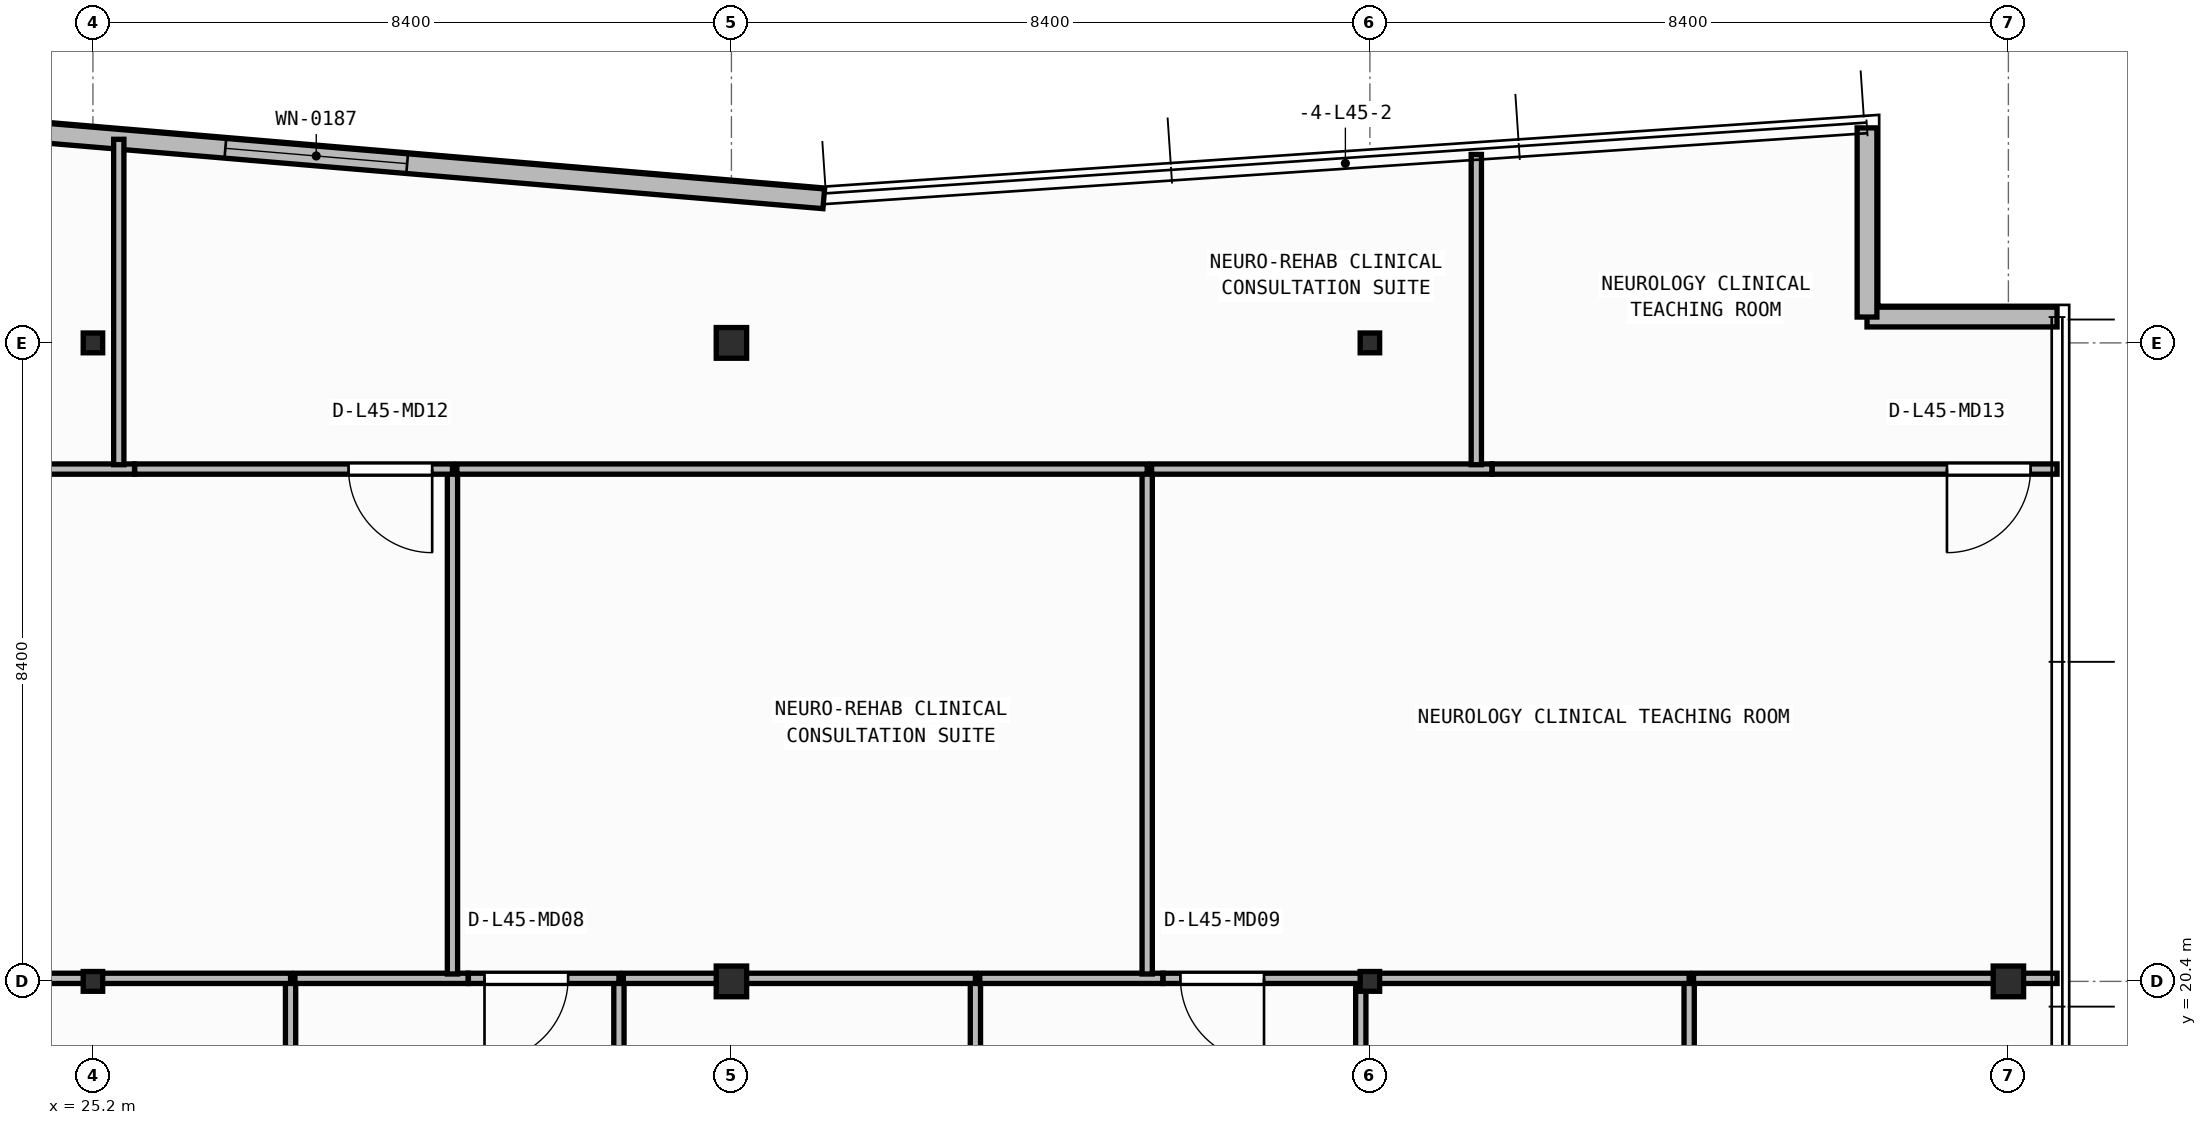
"""IFC4 building model, lengths in metres.
Left out: names, types, materials, properties, quantities, classifications, styles, units other than length and angle.
Written with IfcOpenShell. Run it as: python <this file> out.ifc"""

import sys

from ifc_helpers import new_model, si_unit, direction, frame, frame_2d, origin, origin_2d, place, context, subcontext, project, spatial, rectangle, i_section, extrude, element, fill, save


model = new_model("IFC4")
c1 = context("Model", 3, precision=1e-05, world=origin(), true_north=direction((0.0, 1.0)))
c2 = subcontext(c1, "Body", "Model", "MODEL_VIEW")
j1 = project(units=[si_unit("LENGTHUNIT", "METRE"), si_unit("PLANEANGLEUNIT", "RADIAN")], contexts=[c1])
p1 = place(None, origin())
s1 = spatial("IfcSite", under=j1, at=p1, CompositionType="ELEMENT")
p2 = place(p1, origin())
s2 = spatial("IfcBuilding", under=s1, at=p2, CompositionType="ELEMENT")
p3 = place(p2, frame((0.0, 0.0, 184.2)))
s3 = spatial("IfcBuildingStorey", under=s2, at=p3, CompositionType="ELEMENT", Elevation=184.2)
p4 = place(p3, frame((25.2, 20.4, 0.0), z_axis=(0.0, 0.0, 1.0), x_axis=(1.0, 0.0, 0.0)))
e1 = element("IfcColumn", 1, at=p4, inside=s3, PredefinedType="COLUMN", context=c2, shape_type="SweptSolid", body=[
    extrude(i_section(OverallWidth=0.256, OverallDepth=0.26, WebThickness=0.01, FlangeThickness=0.017, FilletRadius=0.013, at=origin_2d()), origin(), (0.0, 0.0, 1.0), 3.95),
])
p5 = place(p3, frame((33.6, 20.4, 0.0), z_axis=(0.0, 0.0, 1.0), x_axis=(1.0, 0.0, 0.0)))
e2 = element("IfcColumn", 2, at=p5, inside=s3, PredefinedType="COLUMN", context=c2, shape_type="SweptSolid", body=[
    extrude(i_section(OverallWidth=0.4, OverallDepth=0.404, WebThickness=0.02, FlangeThickness=0.032, at=origin_2d()), origin(), (0.0, 0.0, 1.0), 3.95),
])
p6 = place(p3, frame((42.0, 20.4, 0.0), z_axis=(0.0, 0.0, 1.0), x_axis=(1.0, 0.0, 0.0)))
e3 = element("IfcColumn", 3, at=p6, inside=s3, PredefinedType="COLUMN", context=c2, shape_type="SweptSolid", body=[
    extrude(i_section(OverallWidth=0.256, OverallDepth=0.26, WebThickness=0.01, FlangeThickness=0.017, FilletRadius=0.013, at=origin_2d()), origin(), (0.0, 0.0, 1.0), 3.95),
])
p7 = place(p3, frame((50.4, 20.4, 0.0), z_axis=(0.0, 0.0, 1.0), x_axis=(1.0, 0.0, 0.0)))
e4 = element("IfcColumn", 4, at=p7, inside=s3, PredefinedType="COLUMN", context=c2, shape_type="SweptSolid", body=[
    extrude(i_section(OverallWidth=0.4, OverallDepth=0.404, WebThickness=0.02, FlangeThickness=0.032, at=origin_2d()), origin(), (0.0, 0.0, 1.0), 3.95),
])
p8 = place(p3, frame((25.2, 28.8, 0.0), z_axis=(0.0, 0.0, 1.0), x_axis=(1.0, 0.0, 0.0)))
e5 = element("IfcColumn", 5, at=p8, inside=s3, PredefinedType="COLUMN", context=c2, shape_type="SweptSolid", body=[
    extrude(i_section(OverallWidth=0.256, OverallDepth=0.26, WebThickness=0.01, FlangeThickness=0.017, FilletRadius=0.013, at=origin_2d()), origin(), (0.0, 0.0, 1.0), 3.95),
])
p9 = place(p3, frame((33.6, 28.8, 0.0), z_axis=(0.0, 0.0, 1.0), x_axis=(1.0, 0.0, 0.0)))
e6 = element("IfcColumn", 6, at=p9, inside=s3, PredefinedType="COLUMN", context=c2, shape_type="SweptSolid", body=[
    extrude(i_section(OverallWidth=0.4, OverallDepth=0.404, WebThickness=0.02, FlangeThickness=0.032, at=origin_2d()), origin(), (0.0, 0.0, 1.0), 3.95),
])
p10 = place(p3, frame((42.0, 28.8, 0.0), z_axis=(0.0, 0.0, 1.0), x_axis=(1.0, 0.0, 0.0)))
e7 = element("IfcColumn", 7, at=p10, inside=s3, PredefinedType="COLUMN", context=c2, shape_type="SweptSolid", body=[
    extrude(i_section(OverallWidth=0.256, OverallDepth=0.26, WebThickness=0.01, FlangeThickness=0.017, FilletRadius=0.013, at=origin_2d()), origin(), (0.0, 0.0, 1.0), 3.95),
])
p11 = place(p3, frame((51.04, 29.14, 0.0), z_axis=(0.0, 0.0, 1.0), x_axis=(-1.0, 0.0, 0.0)))
e8 = element("IfcWall", 8, at=p11, inside=s3, PredefinedType="STANDARD", context=c2, shape_type="SweptSolid", body=[
    extrude(rectangle(XDim=2.5, YDim=0.26, at=frame_2d((1.25, 0.0))), origin(), (0.0, 0.0, 1.0), 3.71),
])
p12 = place(p3, frame((48.54, 29.14, 0.0), z_axis=(0.0, 0.0, 1.0), x_axis=(0.0, 1.0, 0.0)))
e9 = element("IfcWall", 9, at=p12, inside=s3, PredefinedType="STANDARD", context=c2, shape_type="SweptSolid", body=[
    extrude(rectangle(XDim=2.489, YDim=0.26, at=frame_2d((1.245, 0.0))), origin(), (0.0, 0.0, 1.0), 3.71),
])
p13 = place(p3, frame((34.815, 30.696, 0.0), z_axis=(0.0, 0.0, 1.0), x_axis=(-0.996454704935, 0.084130975344, 0.0)))
e10 = element("IfcWall", 10, at=p13, inside=s3, PredefinedType="STANDARD", context=c2, shape_type="SweptSolid", body=[
    extrude(rectangle(XDim=13.401, YDim=0.26, at=frame_2d((6.701, 0.0))), origin(), (0.0, 0.0, 1.0), 3.71),
])
p14 = place(p13, frame((5.5, 0.0, 0.9)))
e11 = element("IfcOpeningElement", 11, at=p14, cuts=e10, PredefinedType="OPENING", context=c2, shape_type="SweptSolid", body=[
    extrude(rectangle(XDim=2.4, YDim=1.65, at=frame_2d((1.2, 0.825))), frame((0.0, 0.14, 0.0), z_axis=(0.0, -1.0, 0.0), x_axis=(1.0, 0.0, 0.0)), (0.0, 0.0, 1.0), 0.28),
])
p15 = place(p3, frame((27.8, 17.833, 0.0), z_axis=(0.0, 0.0, 1.0), x_axis=(0.0, 1.0, 0.0)))
e12 = element("IfcWall", 12, at=p15, inside=s3, PredefinedType="PARTITIONING", context=c2, shape_type="SweptSolid", body=[
    extrude(rectangle(XDim=2.607, YDim=0.135, at=frame_2d((1.304, 0.0))), origin(), (0.0, 0.0, 1.0), 3.71),
])
p16 = place(p3, frame((27.8, 20.44, 0.0), z_axis=(0.0, 0.0, 1.0), x_axis=(-1.0, 0.0, 0.0)))
e13 = element("IfcWall", 13, at=p16, inside=s3, PredefinedType="PARTITIONING", context=c2, shape_type="SweptSolid", body=[
    extrude(rectangle(XDim=5.012, YDim=0.135, at=frame_2d((2.506, 0.0))), origin(), (0.0, 0.0, 1.0), 3.152),
])
p17 = place(p3, frame((32.12, 14.76, 0.0), z_axis=(0.0, 0.0, 1.0), x_axis=(0.0, 1.0, 0.0)))
e14 = element("IfcWall", 14, at=p17, inside=s3, PredefinedType="PARTITIONING", context=c2, shape_type="SweptSolid", body=[
    extrude(rectangle(XDim=5.68, YDim=0.135, at=frame_2d((2.84, 0.0))), origin(), (0.0, 0.0, 1.0), 3.71),
])
p18 = place(p3, frame((30.137, 20.44, 0.0), z_axis=(0.0, 0.0, 1.0), x_axis=(-1.0, 0.0, 0.0)))
e15 = element("IfcWall", 15, at=p18, inside=s3, PredefinedType="PARTITIONING", context=c2, shape_type="SweptSolid", body=[
    extrude(rectangle(XDim=2.28, YDim=0.135, at=frame_2d((1.14, 0.0))), origin(), (0.0, 0.0, 1.0), 3.152),
])
p19 = place(p3, frame((32.12, 20.44, 0.0), z_axis=(0.0, 0.0, 1.0), x_axis=(-1.0, 0.0, 0.0)))
e16 = element("IfcWall", 16, at=p19, inside=s3, PredefinedType="PARTITIONING", context=c2, shape_type="SweptSolid", body=[
    extrude(rectangle(XDim=1.981, YDim=0.135, at=frame_2d((0.99, 0.0))), origin(), (0.0, 0.0, 1.0), 3.152),
])
p20 = place(p19, frame((0.668, 0.0, 0.0)))
e17 = element("IfcOpeningElement", 17, at=p20, cuts=e16, PredefinedType="OPENING", context=c2, shape_type="SweptSolid", body=[
    extrude(rectangle(XDim=1.1, YDim=2.1, at=frame_2d((0.55, 1.05))), frame((0.0, 0.077, 0.0), z_axis=(0.0, -1.0, 0.0), x_axis=(1.0, 0.0, 0.0)), (0.0, 0.0, 1.0), 0.155),
])
p21 = place(p3, frame((36.81, 17.833, 0.0), z_axis=(0.0, 0.0, 1.0), x_axis=(0.0, 1.0, 0.0)))
e18 = element("IfcWall", 18, at=p21, inside=s3, PredefinedType="PARTITIONING", context=c2, shape_type="SweptSolid", body=[
    extrude(rectangle(XDim=2.607, YDim=0.135, at=frame_2d((1.304, 0.0))), origin(), (0.0, 0.0, 1.0), 3.71),
])
p22 = place(p3, frame((36.81, 20.44, 0.0), z_axis=(0.0, 0.0, 1.0), x_axis=(-1.0, 0.0, 0.0)))
e19 = element("IfcWall", 19, at=p22, inside=s3, PredefinedType="PARTITIONING", context=c2, shape_type="SweptSolid", body=[
    extrude(rectangle(XDim=4.633, YDim=0.135, at=frame_2d((2.316, 0.0))), origin(), (0.0, 0.0, 1.0), 3.152),
])
p23 = place(p3, frame((41.88, 14.76, 0.0), z_axis=(0.0, 0.0, 1.0), x_axis=(0.0, 1.0, 0.0)))
e20 = element("IfcWall", 20, at=p23, inside=s3, PredefinedType="PARTITIONING", context=c2, shape_type="SweptSolid", body=[
    extrude(rectangle(XDim=5.68, YDim=0.135, at=frame_2d((2.84, 0.0))), origin(), (0.0, 0.0, 1.0), 3.152),
])
p24 = place(p3, frame((39.278, 20.44, 0.0), z_axis=(0.0, 0.0, 1.0), x_axis=(-1.0, 0.0, 0.0)))
e21 = element("IfcWall", 21, at=p24, inside=s3, PredefinedType="PARTITIONING", context=c2, shape_type="SweptSolid", body=[
    extrude(rectangle(XDim=2.41, YDim=0.135, at=frame_2d((1.205, 0.0))), origin(), (0.0, 0.0, 1.0), 3.152),
])
p25 = place(p3, frame((41.88, 20.44, 0.0), z_axis=(0.0, 0.0, 1.0), x_axis=(-1.0, 0.0, 0.0)))
e22 = element("IfcWall", 22, at=p25, inside=s3, PredefinedType="PARTITIONING", context=c2, shape_type="SweptSolid", body=[
    extrude(rectangle(XDim=2.6, YDim=0.135, at=frame_2d((1.3, 0.0))), origin(), (0.0, 0.0, 1.0), 3.152),
])
p26 = place(p25, frame((1.273, 0.0, 0.0)))
e23 = element("IfcOpeningElement", 23, at=p26, cuts=e22, PredefinedType="OPENING", context=c2, shape_type="SweptSolid", body=[
    extrude(rectangle(XDim=1.1, YDim=2.1, at=frame_2d((0.55, 1.05))), frame((0.0, 0.077, 0.0), z_axis=(0.0, -1.0, 0.0), x_axis=(1.0, 0.0, 0.0)), (0.0, 0.0, 1.0), 0.155),
])
p27 = place(p3, frame((46.2, 17.833, 0.0), z_axis=(0.0, 0.0, 1.0), x_axis=(0.0, 1.0, 0.0)))
e24 = element("IfcWall", 24, at=p27, inside=s3, PredefinedType="PARTITIONING", context=c2, shape_type="SweptSolid", body=[
    extrude(rectangle(XDim=2.607, YDim=0.135, at=frame_2d((1.304, 0.0))), origin(), (0.0, 0.0, 1.0), 3.71),
])
p28 = place(p3, frame((46.2, 20.44, 0.0), z_axis=(0.0, 0.0, 1.0), x_axis=(-1.0, 0.0, 0.0)))
e25 = element("IfcWall", 25, at=p28, inside=s3, PredefinedType="PARTITIONING", context=c2, shape_type="SweptSolid", body=[
    extrude(rectangle(XDim=4.262, YDim=0.135, at=frame_2d((2.131, 0.0))), origin(), (0.0, 0.0, 1.0), 3.152),
])
p29 = place(p3, frame((51.04, 20.44, 0.0), z_axis=(0.0, 0.0, 1.0), x_axis=(-1.0, 0.0, 0.0)))
e26 = element("IfcWall", 26, at=p29, inside=s3, PredefinedType="PARTITIONING", context=c2, shape_type="SweptSolid", body=[
    extrude(rectangle(XDim=4.782, YDim=0.135, at=frame_2d((2.391, 0.0))), origin(), (0.0, 0.0, 1.0), 3.152),
])
p30 = place(p3, frame((29.93, 20.498, 0.0), z_axis=(0.0, 0.0, 1.0), x_axis=(0.0, 1.0, 0.0)))
e27 = element("IfcWall", 27, at=p30, inside=s3, PredefinedType="PARTITIONING", context=c2, shape_type="SweptSolid", body=[
    extrude(rectangle(XDim=6.642, YDim=0.135, at=frame_2d((3.321, 0.0))), origin(), (0.0, 0.0, 1.0), 3.71),
])
p31 = place(p3, frame((25.748, 27.14, 0.0), z_axis=(0.0, 0.0, 1.0), x_axis=(-1.0, 0.0, 0.0)))
e28 = element("IfcWall", 28, at=p31, inside=s3, PredefinedType="PARTITIONING", context=c2, shape_type="SweptSolid", body=[
    extrude(rectangle(XDim=11.968, YDim=0.135, at=frame_2d((5.984, 0.0))), origin(), (0.0, 0.0, 1.0), 3.71),
])
p32 = place(p3, frame((29.93, 27.14, 0.0), z_axis=(0.0, 0.0, 1.0), x_axis=(-1.0, 0.0, 0.0)))
e29 = element("IfcWall", 29, at=p32, inside=s3, PredefinedType="PARTITIONING", context=c2, shape_type="SweptSolid", body=[
    extrude(rectangle(XDim=4.18, YDim=0.135, at=frame_2d((2.09, 0.0))), origin(), (0.0, 0.0, 1.0), 3.71),
])
p33 = place(p32, frame((0.267, 0.0, 0.0)))
e30 = element("IfcOpeningElement", 30, at=p33, cuts=e29, PredefinedType="OPENING", context=c2, shape_type="SweptSolid", body=[
    extrude(rectangle(XDim=1.1, YDim=2.1, at=frame_2d((0.55, 1.05))), frame((0.0, 0.077, 0.0), z_axis=(0.0, -1.0, 0.0), x_axis=(1.0, 0.0, 0.0)), (0.0, 0.0, 1.0), 0.155),
])
p34 = place(p3, frame((39.07, 20.498, 0.0), z_axis=(0.0, 0.0, 1.0), x_axis=(0.0, 1.0, 0.0)))
e31 = element("IfcWall", 31, at=p34, inside=s3, PredefinedType="PARTITIONING", context=c2, shape_type="SweptSolid", body=[
    extrude(rectangle(XDim=6.642, YDim=0.135, at=frame_2d((3.321, 0.0))), origin(), (0.0, 0.0, 1.0), 3.71),
])
p35 = place(p3, frame((39.07, 27.14, 0.0), z_axis=(0.0, 0.0, 1.0), x_axis=(-1.0, 0.0, 0.0)))
e32 = element("IfcWall", 32, at=p35, inside=s3, PredefinedType="PARTITIONING", context=c2, shape_type="SweptSolid", body=[
    extrude(rectangle(XDim=9.083, YDim=0.135, at=frame_2d((4.541, 0.0))), origin(), (0.0, 0.0, 1.0), 3.71),
])
p36 = place(p3, frame((43.607, 27.14, 0.0), z_axis=(0.0, 0.0, 1.0), x_axis=(-1.0, 0.0, 0.0)))
e33 = element("IfcWall", 33, at=p36, inside=s3, PredefinedType="PARTITIONING", context=c2, shape_type="SweptSolid", body=[
    extrude(rectangle(XDim=4.48, YDim=0.135, at=frame_2d((2.24, 0.0))), origin(), (0.0, 0.0, 1.0), 3.71),
])
p37 = place(p3, frame((51.04, 27.14, 0.0), z_axis=(0.0, 0.0, 1.0), x_axis=(-1.0, 0.0, 0.0)))
e34 = element("IfcWall", 34, at=p37, inside=s3, PredefinedType="PARTITIONING", context=c2, shape_type="SweptSolid", body=[
    extrude(rectangle(XDim=7.43, YDim=0.135, at=frame_2d((3.715, 0.0))), origin(), (0.0, 0.0, 1.0), 3.71),
])
p38 = place(p37, frame((0.348, 0.0, 0.0)))
e35 = element("IfcOpeningElement", 35, at=p38, cuts=e34, PredefinedType="OPENING", context=c2, shape_type="SweptSolid", body=[
    extrude(rectangle(XDim=1.1, YDim=2.1, at=frame_2d((0.55, 1.05))), frame((0.0, 0.077, 0.0), z_axis=(0.0, -1.0, 0.0), x_axis=(1.0, 0.0, 0.0)), (0.0, 0.0, 1.0), 0.155),
])
p39 = place(p3, frame((25.54, 27.198, 0.0), z_axis=(0.0, 0.0, 1.0), x_axis=(0.0, 1.0, 0.0)))
e36 = element("IfcWall", 36, at=p39, inside=s3, PredefinedType="PARTITIONING", context=c2, shape_type="SweptSolid", body=[
    extrude(rectangle(XDim=4.281, YDim=0.135, at=frame_2d((2.141, 0.0))), origin(), (0.0, 0.0, 1.0), 3.152),
])
p40 = place(p3, frame((43.4, 27.198, 0.0), z_axis=(0.0, 0.0, 1.0), x_axis=(0.0, 1.0, 0.0)))
e37 = element("IfcWall", 37, at=p40, inside=s3, PredefinedType="PARTITIONING", context=c2, shape_type="SweptSolid", body=[
    extrude(rectangle(XDim=4.082, YDim=0.135, at=frame_2d((2.041, 0.0))), origin(), (0.0, 0.0, 1.0), 3.71),
])
p41 = place(p14, origin())
e38 = element("IfcWindow", 38, at=p41, inside=s3, PartitioningType="SINGLE_PANEL", PredefinedType="WINDOW", context=c2, shape_type="SweptSolid", body=[
    extrude(rectangle(XDim=2.4, YDim=1.65, at=frame_2d((1.2, 0.825))), frame((0.0, 0.03, 0.0), z_axis=(0.0, -1.0, 0.0), x_axis=(1.0, 0.0, 0.0)), (0.0, 0.0, 1.0), 0.06),
])
fill(e11, e38)
p42 = place(p20, origin())
e39 = element("IfcDoor", 39, at=p42, inside=s3, OperationType="SINGLE_SWING_RIGHT", PredefinedType="DOOR", context=c2, shape_type="SweptSolid", body=[
    extrude(rectangle(XDim=1.1, YDim=2.1, at=frame_2d((0.55, 1.05))), frame((0.0, 0.025, 0.0), z_axis=(0.0, -1.0, 0.0), x_axis=(1.0, 0.0, 0.0)), (0.0, 0.0, 1.0), 0.05),
])
fill(e17, e39)
p43 = place(p26, origin())
e40 = element("IfcDoor", 40, at=p43, inside=s3, OperationType="SINGLE_SWING_LEFT", PredefinedType="DOOR", context=c2, shape_type="SweptSolid", body=[
    extrude(rectangle(XDim=1.1, YDim=2.1, at=frame_2d((0.55, 1.05))), frame((0.0, 0.025, 0.0), z_axis=(0.0, -1.0, 0.0), x_axis=(1.0, 0.0, 0.0)), (0.0, 0.0, 1.0), 0.05),
])
fill(e23, e40)
p44 = place(p33, origin())
e41 = element("IfcDoor", 41, at=p44, inside=s3, OperationType="SINGLE_SWING_LEFT", PredefinedType="DOOR", context=c2, shape_type="SweptSolid", body=[
    extrude(rectangle(XDim=1.1, YDim=2.1, at=frame_2d((0.55, 1.05))), frame((0.0, 0.025, 0.0), z_axis=(0.0, -1.0, 0.0), x_axis=(1.0, 0.0, 0.0)), (0.0, 0.0, 1.0), 0.05),
])
fill(e30, e41)
p45 = place(p38, origin())
e42 = element("IfcDoor", 42, at=p45, inside=s3, OperationType="SINGLE_SWING_RIGHT", PredefinedType="DOOR", context=c2, shape_type="SweptSolid", body=[
    extrude(rectangle(XDim=1.1, YDim=2.1, at=frame_2d((0.55, 1.05))), frame((0.0, 0.025, 0.0), z_axis=(0.0, -1.0, 0.0), x_axis=(1.0, 0.0, 0.0)), (0.0, 0.0, 1.0), 0.05),
])
fill(e35, e42)
save(model, sys.argv[1])
